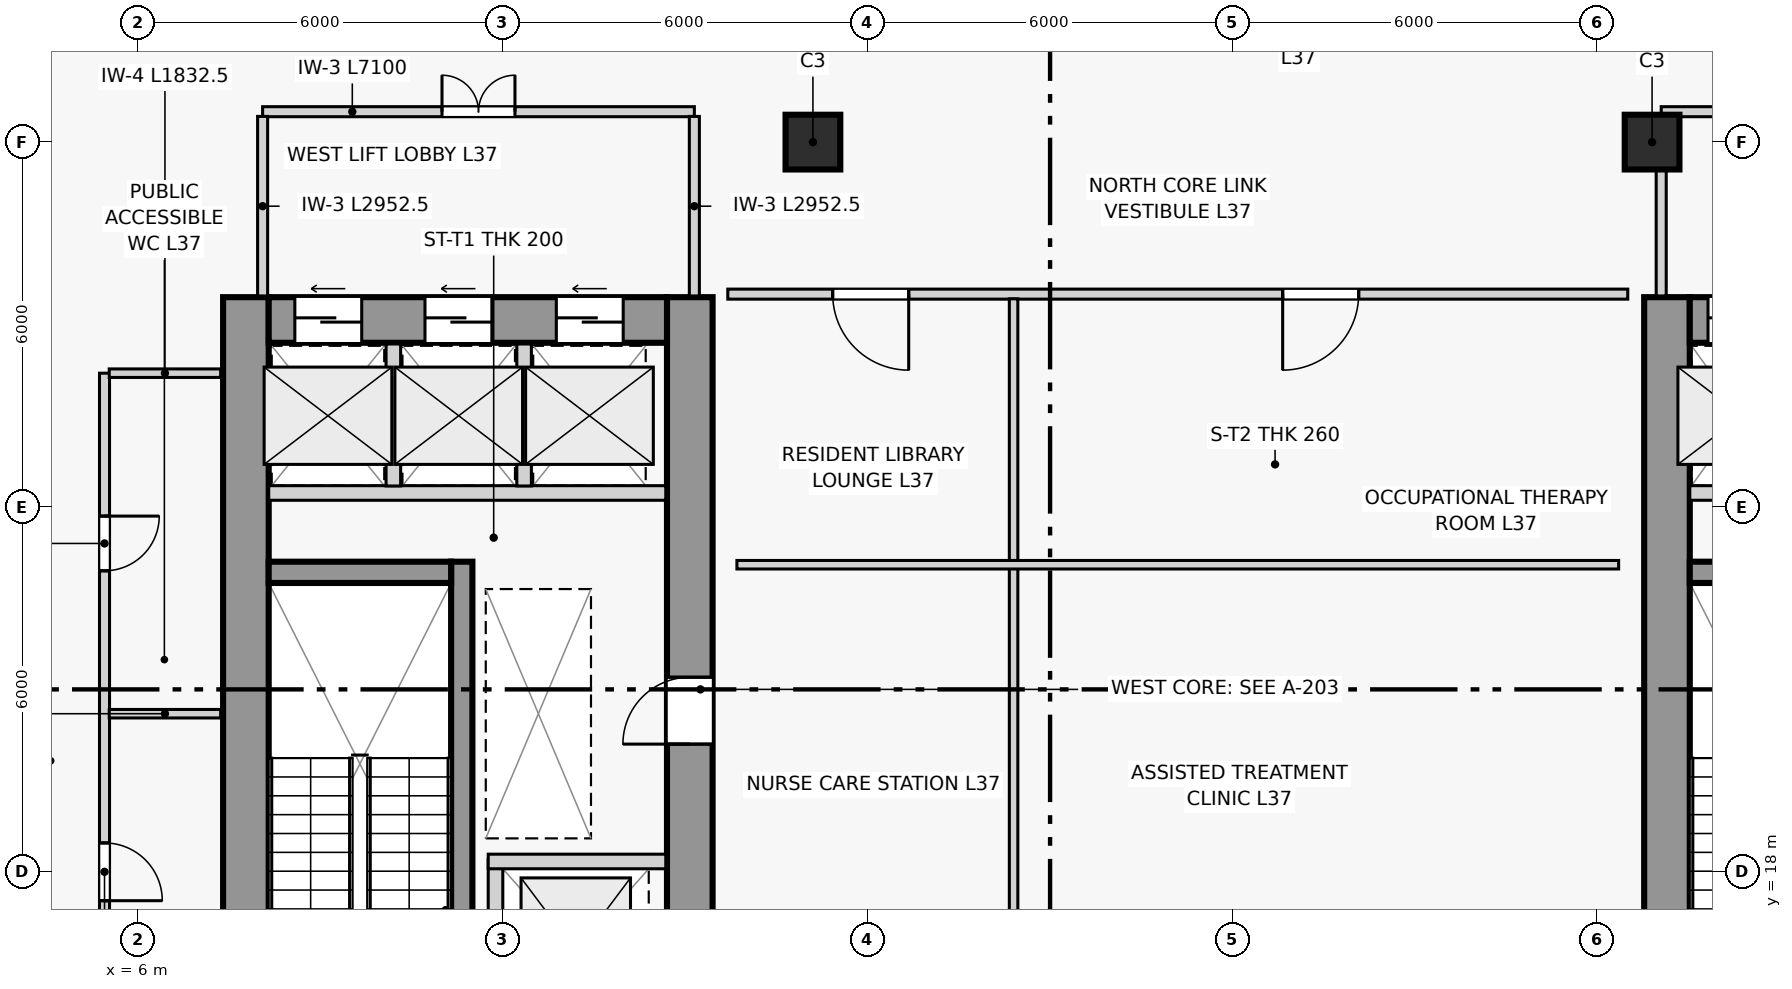
"""IFC4 building model, lengths in metres.
Left out: names, types, materials, properties, quantities, classifications, styles, units other than length and angle.
Written with IfcOpenShell. Run it as: python <this file> out.ifc"""

import sys

from ifc_helpers import new_model, si_unit, direction, frame, frame_2d, origin, origin_2d, place, context, subcontext, project, spatial, rectangle, extrude, source, transform, mapped, element, fill, save


model = new_model("IFC4")
c1 = context("Model", 3, precision=1e-05, world=origin(), true_north=direction((0.0, 1.0)))
c2 = subcontext(c1, "Body", "Model", "MODEL_VIEW")
j1 = project(units=[si_unit("LENGTHUNIT", "METRE"), si_unit("PLANEANGLEUNIT", "RADIAN")], contexts=[c1])
p1 = place(None, origin())
s1 = spatial("IfcSite", under=j1, at=p1, CompositionType="ELEMENT")
p2 = place(p1, origin())
s2 = spatial("IfcBuilding", under=s1, at=p2, CompositionType="ELEMENT")
p3 = place(p2, frame((0.0, 0.0, 141.3)))
s3 = spatial("IfcBuildingStorey", under=s2, at=p3, CompositionType="ELEMENT", Elevation=141.3)
p4 = place(p3, frame((7.775, 14.6, 0.0), z_axis=(0.0, 0.0, 1.0), x_axis=(0.0, 1.0, 0.0)))
e1 = element("IfcWall", 1, at=p4, inside=s3, PredefinedType="SHEAR", context=c2, shape_type="SweptSolid", body=[
    extrude(rectangle(XDim=12.85, YDim=0.75, at=frame_2d((6.425, 0.0))), origin(), (0.0, 0.0, 1.0), 3.6),
])
p5 = place(p3, frame((15.075, 14.6, 0.0), z_axis=(0.0, 0.0, 1.0), x_axis=(0.0, 1.0, 0.0)))
e2 = element("IfcWall", 2, at=p5, inside=s3, PredefinedType="SHEAR", context=c2, shape_type="SweptSolid", body=[
    extrude(rectangle(XDim=12.85, YDim=0.75, at=frame_2d((6.425, 0.0))), origin(), (0.0, 0.0, 1.0), 3.6),
])
p6 = place(p5, frame((5.5, 0.0, 0.0)))
e3 = element("IfcOpeningElement", 3, at=p6, cuts=e2, PredefinedType="OPENING", context=c2, shape_type="SweptSolid", body=[
    extrude(rectangle(XDim=1.1, YDim=2.2, at=frame_2d((0.55, 1.1))), frame((0.0, 0.385, 0.0), z_axis=(0.0, -1.0, 0.0), x_axis=(1.0, 0.0, 0.0)), (0.0, 0.0, 1.0), 0.77),
])
p7 = place(p3, frame((8.15, 27.075, 0.0), z_axis=(0.0, 0.0, 1.0), x_axis=(1.0, 0.0, 0.0)))
e4 = element("IfcWall", 4, at=p7, inside=s3, PredefinedType="SHEAR", context=c2, shape_type="SweptSolid", body=[
    extrude(rectangle(XDim=6.55, YDim=0.75, at=frame_2d((3.275, 0.0))), origin(), (0.0, 0.0, 1.0), 3.6),
])
p8 = place(p7, frame((0.43, 0.0, 0.0)))
e5 = element("IfcOpeningElement", 5, at=p8, cuts=e4, PredefinedType="OPENING", context=c2, shape_type="SweptSolid", body=[
    extrude(rectangle(XDim=1.1, YDim=2.2, at=frame_2d((0.55, 1.1))), frame((0.0, 0.385, 0.0), z_axis=(0.0, -1.0, 0.0), x_axis=(1.0, 0.0, 0.0)), (0.0, 0.0, 1.0), 0.77),
])
p9 = place(p7, frame((2.57, 0.0, 0.0)))
e6 = element("IfcOpeningElement", 6, at=p9, cuts=e4, PredefinedType="OPENING", context=c2, shape_type="SweptSolid", body=[
    extrude(rectangle(XDim=1.1, YDim=2.2, at=frame_2d((0.55, 1.1))), frame((0.0, 0.385, 0.0), z_axis=(0.0, -1.0, 0.0), x_axis=(1.0, 0.0, 0.0)), (0.0, 0.0, 1.0), 0.77),
])
p10 = place(p7, frame((4.73, 0.0, 0.0)))
e7 = element("IfcOpeningElement", 7, at=p10, cuts=e4, PredefinedType="OPENING", context=c2, shape_type="SweptSolid", body=[
    extrude(rectangle(XDim=1.1, YDim=2.2, at=frame_2d((0.55, 1.1))), frame((0.0, 0.385, 0.0), z_axis=(0.0, -1.0, 0.0), x_axis=(1.0, 0.0, 0.0)), (0.0, 0.0, 1.0), 0.77),
])
p11 = place(p3, frame((31.145, 14.6, 0.0), z_axis=(0.0, 0.0, 1.0), x_axis=(0.0, 1.0, 0.0)))
e8 = element("IfcWall", 8, at=p11, inside=s3, PredefinedType="SHEAR", context=c2, shape_type="SweptSolid", body=[
    extrude(rectangle(XDim=12.85, YDim=0.75, at=frame_2d((6.425, 0.0))), origin(), (0.0, 0.0, 1.0), 3.6),
])
p12 = place(p3, frame((31.52, 27.075, 0.0), z_axis=(0.0, 0.0, 1.0), x_axis=(1.0, 0.0, 0.0)))
e9 = element("IfcWall", 9, at=p12, inside=s3, PredefinedType="SHEAR", context=c2, shape_type="SweptSolid", body=[
    extrude(rectangle(XDim=5.38, YDim=0.75, at=frame_2d((2.69, 0.0))), origin(), (0.0, 0.0, 1.0), 3.6),
])
p13 = place(p12, frame((0.3, 0.0, 0.0)))
e10 = element("IfcOpeningElement", 10, at=p13, cuts=e9, PredefinedType="OPENING", context=c2, shape_type="SweptSolid", body=[
    extrude(rectangle(XDim=1.1, YDim=2.2, at=frame_2d((0.55, 1.1))), frame((0.0, 0.385, 0.0), z_axis=(0.0, -1.0, 0.0), x_axis=(1.0, 0.0, 0.0)), (0.0, 0.0, 1.0), 0.77),
])
p14 = place(p12, frame((2.13, 0.0, 0.0)))
e11 = element("IfcOpeningElement", 11, at=p14, cuts=e9, PredefinedType="OPENING", context=c2, shape_type="SweptSolid", body=[
    extrude(rectangle(XDim=1.1, YDim=2.2, at=frame_2d((0.55, 1.1))), frame((0.0, 0.385, 0.0), z_axis=(0.0, -1.0, 0.0), x_axis=(1.0, 0.0, 0.0)), (0.0, 0.0, 1.0), 0.77),
])
p15 = place(p12, frame((3.96, 0.0, 0.0)))
e12 = element("IfcOpeningElement", 12, at=p15, cuts=e9, PredefinedType="OPENING", context=c2, shape_type="SweptSolid", body=[
    extrude(rectangle(XDim=1.1, YDim=2.2, at=frame_2d((0.55, 1.1))), frame((0.0, 0.385, 0.0), z_axis=(0.0, -1.0, 0.0), x_axis=(1.0, 0.0, 0.0)), (0.0, 0.0, 1.0), 0.77),
])
p16 = place(p3, frame((11.325, 15.35, 0.0), z_axis=(0.0, 0.0, 1.0), x_axis=(0.0, 1.0, 0.0)))
e13 = element("IfcWall", 13, at=p16, inside=s3, PredefinedType="SHEAR", context=c2, shape_type="SweptSolid", body=[
    extrude(rectangle(XDim=7.75, YDim=0.35, at=frame_2d((3.875, 0.0))), origin(), (0.0, 0.0, 1.0), 3.6),
])
for number, where, z_axis, x_axis in (
    (14, (8.15, 22.925, 0.0), (0.0, 0.0, 1.0), (1.0, 0.0, 0.0)),
    (15, (31.52, 22.925, 0.0), (0.0, 0.0, 1.0), (1.0, 0.0, 0.0)),
):
    element("IfcWall", number, at=place(p3, frame(where, z_axis=z_axis, x_axis=x_axis)), inside=s3, PredefinedType="SHEAR", context=c2, shape_type="SweptSolid", body=[
        extrude(rectangle(XDim=3.0, YDim=0.35, at=frame_2d((1.5, 0.0))), origin(), (0.0, 0.0, 1.0), 3.6),
    ])
m1 = source(origin(), c2, "Body", "SweptSolid", [
    extrude(rectangle(XDim=0.9, YDim=0.9, at=origin_2d()), origin(), (0.0, 0.0, 1.0), 3.6),
])
for number, where, z_axis, x_axis in (
    (16, (17.1, 30.0, 0.0), (0.0, 0.0, 1.0), (1.0, 0.0, 0.0)),
    (17, (30.9, 30.0, 0.0), (0.0, 0.0, 1.0), (1.0, 0.0, 0.0)),
):
    element("IfcColumn", number, at=place(p3, frame(where, z_axis=z_axis, x_axis=x_axis)), inside=s3, PredefinedType="COLUMN", context=c2, shape_type="MappedRepresentation", body=[
        mapped(m1, transform((0.0, 0.0, 0.0), scale=1.0)),
    ])
p17 = place(p3, frame((11.88, 15.35, 0.0), z_axis=(0.0, 0.0, 1.0), x_axis=(0.0, 1.0, 0.0)))
e18 = element("IfcWall", 18, at=p17, inside=s3, PredefinedType="PARTITIONING", context=c2, shape_type="SweptSolid", body=[
    extrude(rectangle(XDim=2.85, YDim=0.24, at=frame_2d((1.425, 0.0))), origin(), (0.0, 0.0, 1.0), 3.32),
])
p18 = place(p3, frame((11.76, 18.17, 0.0), z_axis=(0.0, 0.0, 1.0), x_axis=(1.0, 0.0, 0.0)))
e19 = element("IfcWall", 19, at=p18, inside=s3, PredefinedType="PARTITIONING", context=c2, shape_type="SweptSolid", body=[
    extrude(rectangle(XDim=2.92, YDim=0.24, at=frame_2d((1.46, 0.0))), origin(), (0.0, 0.0, 1.0), 3.32),
])
p19 = place(p3, frame((8.15, 24.23, 0.0), z_axis=(0.0, 0.0, 1.0), x_axis=(1.0, 0.0, 0.0)))
e20 = element("IfcWall", 20, at=p19, inside=s3, PredefinedType="PARTITIONING", context=c2, shape_type="SweptSolid", body=[
    extrude(rectangle(XDim=6.53, YDim=0.24, at=frame_2d((3.265, 0.0))), origin(), (0.0, 0.0, 1.0), 3.32),
])
for number, where, z_axis, x_axis in (
    (21, (10.2, 24.345, 0.0), (0.0, 0.0, 1.0), (0.0, 1.0, 0.0)),
    (22, (12.35, 24.345, 0.0), (0.0, 0.0, 1.0), (0.0, 1.0, 0.0)),
):
    element("IfcWall", number, at=place(p3, frame(where, z_axis=z_axis, x_axis=x_axis)), inside=s3, PredefinedType="PARTITIONING", context=c2, shape_type="SweptSolid", body=[
        extrude(rectangle(XDim=2.335, YDim=0.24, at=frame_2d((1.167, 0.0))), origin(), (0.0, 0.0, 1.0), 3.32),
    ])
p20 = place(p3, frame((31.52, 24.23, 0.0), z_axis=(0.0, 0.0, 1.0), x_axis=(1.0, 0.0, 0.0)))
e23 = element("IfcWall", 23, at=p20, inside=s3, PredefinedType="PARTITIONING", context=c2, shape_type="SweptSolid", body=[
    extrude(rectangle(XDim=5.36, YDim=0.24, at=frame_2d((2.68, 0.0))), origin(), (0.0, 0.0, 1.0), 3.32),
])
p21 = place(p3, frame((8.05, 30.5, 0.0), z_axis=(0.0, 0.0, 1.0), x_axis=(1.0, 0.0, 0.0)))
e24 = element("IfcWall", 24, at=p21, inside=s3, PredefinedType="PARTITIONING", context=c2, shape_type="SweptSolid", body=[
    extrude(rectangle(XDim=7.1, YDim=0.165, at=frame_2d((3.55, 0.0))), origin(), (0.0, 0.0, 1.0), 3.32),
])
p22 = place(p21, frame((2.95, 0.0, 0.0)))
e25 = element("IfcOpeningElement", 25, at=p22, cuts=e24, PredefinedType="OPENING", context=c2, shape_type="SweptSolid", body=[
    extrude(rectangle(XDim=1.2, YDim=2.2, at=frame_2d((0.6, 1.1))), frame((0.0, 0.093, 0.0), z_axis=(0.0, -1.0, 0.0), x_axis=(1.0, 0.0, 0.0)), (0.0, 0.0, 1.0), 0.185),
])
for number, where, z_axis, x_axis in (
    (26, (8.05, 27.47, 0.0), (0.0, 0.0, 1.0), (0.0, 1.0, 0.0)),
    (27, (15.15, 27.47, 0.0), (0.0, 0.0, 1.0), (0.0, 1.0, 0.0)),
):
    element("IfcWall", number, at=place(p3, frame(where, z_axis=z_axis, x_axis=x_axis)), inside=s3, PredefinedType="PARTITIONING", context=c2, shape_type="SweptSolid", body=[
        extrude(rectangle(XDim=2.953, YDim=0.165, at=frame_2d((1.476, 0.0))), origin(), (0.0, 0.0, 1.0), 3.32),
    ])
p23 = place(p3, frame((31.05, 30.5, 0.0), z_axis=(0.0, 0.0, 1.0), x_axis=(1.0, 0.0, 0.0)))
e28 = element("IfcWall", 28, at=p23, inside=s3, PredefinedType="PARTITIONING", context=c2, shape_type="SweptSolid", body=[
    extrude(rectangle(XDim=6.2, YDim=0.165, at=frame_2d((3.1, 0.0))), origin(), (0.0, 0.0, 1.0), 3.32),
])
p24 = place(p23, frame((2.5, 0.0, 0.0)))
e29 = element("IfcOpeningElement", 29, at=p24, cuts=e28, PredefinedType="OPENING", context=c2, shape_type="SweptSolid", body=[
    extrude(rectangle(XDim=1.2, YDim=2.2, at=frame_2d((0.6, 1.1))), frame((0.0, 0.093, 0.0), z_axis=(0.0, -1.0, 0.0), x_axis=(1.0, 0.0, 0.0)), (0.0, 0.0, 1.0), 0.185),
])
p25 = place(p3, frame((31.05, 27.47, 0.0), z_axis=(0.0, 0.0, 1.0), x_axis=(0.0, 1.0, 0.0)))
e30 = element("IfcWall", 30, at=p25, inside=s3, PredefinedType="PARTITIONING", context=c2, shape_type="SweptSolid", body=[
    extrude(rectangle(XDim=2.953, YDim=0.165, at=frame_2d((1.476, 0.0))), origin(), (0.0, 0.0, 1.0), 2.776),
])
p26 = place(p3, frame((5.45, 15.4, 0.0), z_axis=(0.0, 0.0, 1.0), x_axis=(0.0, 1.0, 0.0)))
e31 = element("IfcWall", 31, at=p26, inside=s3, PredefinedType="PARTITIONING", context=c2, shape_type="SweptSolid", body=[
    extrude(rectangle(XDim=10.8, YDim=0.165, at=frame_2d((5.4, 0.0))), origin(), (0.0, 0.0, 1.0), 3.32),
])
p27 = place(p26, frame((2.125, 0.0, 0.0)))
e32 = element("IfcOpeningElement", 32, at=p27, cuts=e31, PredefinedType="OPENING", context=c2, shape_type="SweptSolid", body=[
    extrude(rectangle(XDim=0.95, YDim=2.1, at=frame_2d((0.475, 1.05))), frame((0.0, 0.093, 0.0), z_axis=(0.0, -1.0, 0.0), x_axis=(1.0, 0.0, 0.0)), (0.0, 0.0, 1.0), 0.185),
])
p28 = place(p26, frame((7.55, 0.0, 0.0)))
e33 = element("IfcOpeningElement", 33, at=p28, cuts=e31, PredefinedType="OPENING", context=c2, shape_type="SweptSolid", body=[
    extrude(rectangle(XDim=0.9, YDim=2.1, at=frame_2d((0.45, 1.05))), frame((0.0, 0.093, 0.0), z_axis=(0.0, -1.0, 0.0), x_axis=(1.0, 0.0, 0.0)), (0.0, 0.0, 1.0), 0.185),
])
p29 = place(p3, frame((5.528, 26.2, 0.0), z_axis=(0.0, 0.0, 1.0), x_axis=(1.0, 0.0, 0.0)))
e34 = element("IfcWall", 34, at=p29, inside=s3, PredefinedType="PARTITIONING", context=c2, shape_type="SweptSolid", body=[
    extrude(rectangle(XDim=1.833, YDim=0.14, at=frame_2d((0.916, 0.0))), origin(), (0.0, 0.0, 1.0), 3.32),
])
p30 = place(p3, frame((5.528, 20.6, 0.0), z_axis=(0.0, 0.0, 1.0), x_axis=(1.0, 0.0, 0.0)))
e35 = element("IfcWall", 35, at=p30, inside=s3, PredefinedType="PLUMBINGWALL", context=c2, shape_type="SweptSolid", body=[
    extrude(rectangle(XDim=1.833, YDim=0.14, at=frame_2d((0.916, 0.0))), origin(), (0.0, 0.0, 1.0), 3.32),
])
p31 = place(p3, frame((15.7, 27.5, 0.0), z_axis=(0.0, 0.0, 1.0), x_axis=(1.0, 0.0, 0.0)))
e36 = element("IfcWall", 36, at=p31, inside=s3, PredefinedType="PARTITIONING", context=c2, shape_type="SweptSolid", body=[
    extrude(rectangle(XDim=14.8, YDim=0.165, at=frame_2d((7.4, 0.0))), origin(), (0.0, 0.0, 1.0), 3.32),
])
p32 = place(p31, frame((1.725, 0.0, 0.0)))
e37 = element("IfcOpeningElement", 37, at=p32, cuts=e36, PredefinedType="OPENING", context=c2, shape_type="SweptSolid", body=[
    extrude(rectangle(XDim=1.25, YDim=2.2, at=frame_2d((0.625, 1.1))), frame((0.0, 0.093, 0.0), z_axis=(0.0, -1.0, 0.0), x_axis=(1.0, 0.0, 0.0)), (0.0, 0.0, 1.0), 0.185),
])
p33 = place(p31, frame((9.125, 0.0, 0.0)))
e38 = element("IfcOpeningElement", 38, at=p33, cuts=e36, PredefinedType="OPENING", context=c2, shape_type="SweptSolid", body=[
    extrude(rectangle(XDim=1.25, YDim=2.2, at=frame_2d((0.625, 1.1))), frame((0.0, 0.093, 0.0), z_axis=(0.0, -1.0, 0.0), x_axis=(1.0, 0.0, 0.0)), (0.0, 0.0, 1.0), 0.185),
])
p34 = place(p3, frame((20.4, 14.577, 0.0), z_axis=(0.0, 0.0, 1.0), x_axis=(0.0, 1.0, 0.0)))
e39 = element("IfcWall", 39, at=p34, inside=s3, PredefinedType="PARTITIONING", context=c2, shape_type="SweptSolid", body=[
    extrude(rectangle(XDim=12.845, YDim=0.14, at=frame_2d((6.423, 0.0))), origin(), (0.0, 0.0, 1.0), 3.32),
])
p35 = place(p3, frame((15.85, 23.05, 0.0), z_axis=(0.0, 0.0, 1.0), x_axis=(1.0, 0.0, 0.0)))
e40 = element("IfcWall", 40, at=p35, inside=s3, PredefinedType="PARTITIONING", context=c2, shape_type="SweptSolid", body=[
    extrude(rectangle(XDim=14.5, YDim=0.14, at=frame_2d((7.25, 0.0))), origin(), (0.0, 0.0, 1.0), 3.32),
])
m2 = source(origin(), c2, "Body", "SweptSolid", [
    extrude(rectangle(XDim=1.1, YDim=2.2, at=frame_2d((0.55, 1.1))), frame((0.0, 0.025, 0.0), z_axis=(0.0, -1.0, 0.0), x_axis=(1.0, 0.0, 0.0)), (0.0, 0.0, 1.0), 0.05),
])
p36 = place(p8, origin())
e41 = element("IfcDoor", 41, at=p36, inside=s3, OperationType="SLIDING_TO_LEFT", PredefinedType="DOOR", context=c2, shape_type="MappedRepresentation", body=[
    mapped(m2, transform((0.0, 0.0, 0.0), scale=1.0)),
])
fill(e5, e41)
p37 = place(p9, origin())
e42 = element("IfcDoor", 42, at=p37, inside=s3, OperationType="SLIDING_TO_LEFT", PredefinedType="DOOR", context=c2, shape_type="MappedRepresentation", body=[
    mapped(m2, transform((0.0, 0.0, 0.0), scale=1.0)),
])
fill(e6, e42)
p38 = place(p10, origin())
e43 = element("IfcDoor", 43, at=p38, inside=s3, OperationType="SLIDING_TO_LEFT", PredefinedType="DOOR", context=c2, shape_type="MappedRepresentation", body=[
    mapped(m2, transform((0.0, 0.0, 0.0), scale=1.0)),
])
fill(e7, e43)
p39 = place(p13, origin())
e44 = element("IfcDoor", 44, at=p39, inside=s3, OperationType="SLIDING_TO_LEFT", PredefinedType="DOOR", context=c2, shape_type="MappedRepresentation", body=[
    mapped(m2, transform((0.0, 0.0, 0.0), scale=1.0)),
])
fill(e10, e44)
m3 = source(origin(), c2, "Body", "SweptSolid", [
    extrude(rectangle(XDim=1.2, YDim=2.2, at=frame_2d((0.6, 1.1))), frame((0.0, 0.025, 0.0), z_axis=(0.0, -1.0, 0.0), x_axis=(1.0, 0.0, 0.0)), (0.0, 0.0, 1.0), 0.05),
])
p40 = place(p22, origin())
e45 = element("IfcDoor", 45, at=p40, inside=s3, OperationType="DOUBLE_DOOR_SINGLE_SWING", PredefinedType="DOOR", context=c2, shape_type="MappedRepresentation", body=[
    mapped(m3, transform((0.0, 0.0, 0.0), scale=1.0)),
])
fill(e25, e45)
m4 = source(origin(), c2, "Body", "SweptSolid", [
    extrude(rectangle(XDim=1.1, YDim=2.2, at=frame_2d((0.55, 1.1))), frame((0.0, 0.025, 0.0), z_axis=(0.0, -1.0, 0.0), x_axis=(1.0, 0.0, 0.0)), (0.0, 0.0, 1.0), 0.05),
])
p41 = place(p6, origin())
e46 = element("IfcDoor", 46, at=p41, inside=s3, OperationType="SINGLE_SWING_LEFT", PredefinedType="DOOR", context=c2, shape_type="MappedRepresentation", body=[
    mapped(m4, transform((0.0, 0.0, 0.0), scale=1.0)),
])
fill(e3, e46)
m5 = source(origin(), c2, "Body", "SweptSolid", [
    extrude(rectangle(XDim=0.95, YDim=2.1, at=frame_2d((0.475, 1.05))), frame((0.0, 0.025, 0.0), z_axis=(0.0, -1.0, 0.0), x_axis=(1.0, 0.0, 0.0)), (0.0, 0.0, 1.0), 0.05),
])
p42 = place(p27, frame((0.95, 0.0, 0.0), z_axis=(0.0, 0.0, 1.0), x_axis=(-1.0, 0.0, 0.0)))
e47 = element("IfcDoor", 47, at=p42, inside=s3, OperationType="SINGLE_SWING_RIGHT", PredefinedType="DOOR", context=c2, shape_type="MappedRepresentation", body=[
    mapped(m5, transform((0.0, 0.0, 0.0), scale=1.0)),
])
fill(e32, e47)
m6 = source(origin(), c2, "Body", "SweptSolid", [
    extrude(rectangle(XDim=0.9, YDim=2.1, at=frame_2d((0.45, 1.05))), frame((0.0, 0.025, 0.0), z_axis=(0.0, -1.0, 0.0), x_axis=(1.0, 0.0, 0.0)), (0.0, 0.0, 1.0), 0.05),
])
p43 = place(p28, frame((0.9, 0.0, 0.0), z_axis=(0.0, 0.0, 1.0), x_axis=(-1.0, 0.0, 0.0)))
e48 = element("IfcDoor", 48, at=p43, inside=s3, OperationType="SINGLE_SWING_LEFT", PredefinedType="DOOR", context=c2, shape_type="MappedRepresentation", body=[
    mapped(m6, transform((0.0, 0.0, 0.0), scale=1.0)),
])
fill(e33, e48)
m7 = source(origin(), c2, "Body", "SweptSolid", [
    extrude(rectangle(XDim=1.25, YDim=2.2, at=frame_2d((0.625, 1.1))), frame((0.0, 0.025, 0.0), z_axis=(0.0, -1.0, 0.0), x_axis=(1.0, 0.0, 0.0)), (0.0, 0.0, 1.0), 0.05),
])
p44 = place(p32, frame((1.25, 0.0, 0.0), z_axis=(0.0, 0.0, 1.0), x_axis=(-1.0, 0.0, 0.0)))
e49 = element("IfcDoor", 49, at=p44, inside=s3, OperationType="SINGLE_SWING_LEFT", PredefinedType="DOOR", context=c2, shape_type="MappedRepresentation", body=[
    mapped(m7, transform((0.0, 0.0, 0.0), scale=1.0)),
])
fill(e37, e49)
p45 = place(p33, frame((1.25, 0.0, 0.0), z_axis=(0.0, 0.0, 1.0), x_axis=(-1.0, 0.0, 0.0)))
e50 = element("IfcDoor", 50, at=p45, inside=s3, OperationType="SINGLE_SWING_RIGHT", PredefinedType="DOOR", context=c2, shape_type="MappedRepresentation", body=[
    mapped(m7, transform((0.0, 0.0, 0.0), scale=1.0)),
])
fill(e38, e50)
save(model, sys.argv[1])
